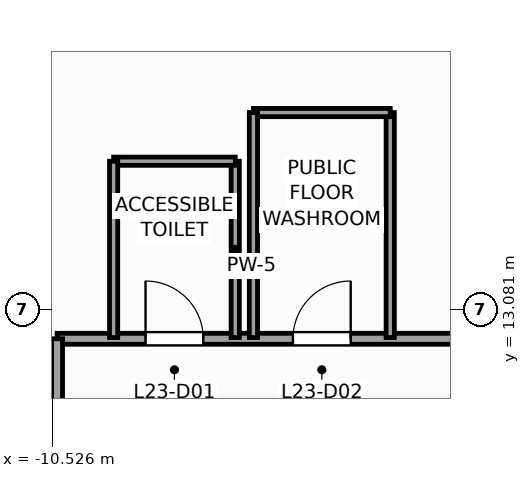
"""IFC4 building model, lengths in metres.
Left out: names, types, materials, properties, quantities, classifications, styles, units other than length and angle.
Written with IfcOpenShell. Run it as: python <this file> out.ifc"""

import sys

from ifc_helpers import new_model, si_unit, direction, frame, frame_2d, origin, place, context, subcontext, project, spatial, rectangle, extrude, source, transform, mapped, element, fill, save


model = new_model("IFC4")
c1 = context("Model", 3, precision=1e-05, world=origin(), true_north=direction((0.0, 1.0)))
c2 = subcontext(c1, "Body", "Model", "MODEL_VIEW")
j1 = project(units=[si_unit("LENGTHUNIT", "METRE"), si_unit("PLANEANGLEUNIT", "RADIAN")], contexts=[c1])
p1 = place(None, origin())
s1 = spatial("IfcSite", under=j1, at=p1, CompositionType="ELEMENT")
p2 = place(p1, origin())
s2 = spatial("IfcBuilding", under=s1, at=p2, CompositionType="ELEMENT")
p3 = place(p2, frame((0.0, 0.0, 99.2)))
s3 = spatial("IfcBuildingStorey", under=s2, at=p3, CompositionType="ELEMENT", Elevation=99.2)
p4 = place(p3, frame((-10.45, 12.6, 0.0), z_axis=(0.0, 0.0, 1.0), x_axis=(1.0, 0.0, 0.0)))
e1 = element("IfcWall", 1, at=p4, inside=s3, PredefinedType="PARTITIONING", context=c2, shape_type="SweptSolid", body=[
    extrude(rectangle(XDim=23.05, YDim=0.18, at=frame_2d((11.525, 0.0))), origin(), (0.0, 0.0, 1.0), 3.74),
])
p5 = place(p4, frame((1.455, 0.0, 0.0)))
e2 = element("IfcOpeningElement", 2, at=p5, cuts=e1, PredefinedType="OPENING", context=c2, shape_type="SweptSolid", body=[
    extrude(rectangle(XDim=0.95, YDim=2.1, at=frame_2d((0.475, 1.05))), frame((0.0, 0.1, 0.0), z_axis=(0.0, -1.0, 0.0), x_axis=(1.0, 0.0, 0.0)), (0.0, 0.0, 1.0), 0.2),
])
p6 = place(p4, frame((3.879, 0.0, 0.0)))
e3 = element("IfcOpeningElement", 3, at=p6, cuts=e1, PredefinedType="OPENING", context=c2, shape_type="SweptSolid", body=[
    extrude(rectangle(XDim=0.95, YDim=2.1, at=frame_2d((0.475, 1.05))), frame((0.0, 0.1, 0.0), z_axis=(0.0, -1.0, 0.0), x_axis=(1.0, 0.0, 0.0)), (0.0, 0.0, 1.0), 0.2),
])
p7 = place(p4, frame((14.436, 0.0, 0.0)))
e4 = element("IfcOpeningElement", 4, at=p7, cuts=e1, PredefinedType="OPENING", context=c2, shape_type="SweptSolid", body=[
    extrude(rectangle(XDim=1.1, YDim=2.2, at=frame_2d((0.55, 1.1))), frame((0.0, 0.1, 0.0), z_axis=(0.0, -1.0, 0.0), x_axis=(1.0, 0.0, 0.0)), (0.0, 0.0, 1.0), 0.2),
])
p8 = place(p3, frame((-10.45, -1.05, 0.0), z_axis=(0.0, 0.0, 1.0), x_axis=(0.0, 1.0, 0.0)))
e5 = element("IfcWall", 5, at=p8, inside=s3, PredefinedType="PARTITIONING", context=c2, shape_type="SweptSolid", body=[
    extrude(rectangle(XDim=13.65, YDim=0.18, at=frame_2d((6.825, 0.0))), origin(), (0.0, 0.0, 1.0), 3.74),
])
p9 = place(p3, frame((-7.52, 12.62, 0.0), z_axis=(0.0, 0.0, 1.0), x_axis=(0.0, 1.0, 0.0)))
e6 = element("IfcWall", 6, at=p9, inside=s3, PredefinedType="PARTITIONING", context=c2, shape_type="SweptSolid", body=[
    extrude(rectangle(XDim=2.9, YDim=0.135, at=frame_2d((1.45, 0.0))), origin(), (0.0, 0.0, 1.0), 3.74),
])
p10 = place(p3, frame((-9.52, 15.52, 0.0), z_axis=(0.0, 0.0, 1.0), x_axis=(1.0, 0.0, 0.0)))
e7 = element("IfcWall", 7, at=p10, inside=s3, PredefinedType="PARTITIONING", context=c2, shape_type="SweptSolid", body=[
    extrude(rectangle(XDim=2.0, YDim=0.135, at=frame_2d((1.0, 0.0))), origin(), (0.0, 0.0, 1.0), 3.74),
])
p11 = place(p3, frame((-9.52, 12.62, 0.0), z_axis=(0.0, 0.0, 1.0), x_axis=(0.0, 1.0, 0.0)))
e8 = element("IfcWall", 8, at=p11, inside=s3, PredefinedType="PARTITIONING", context=c2, shape_type="SweptSolid", body=[
    extrude(rectangle(XDim=2.9, YDim=0.135, at=frame_2d((1.45, 0.0))), origin(), (0.0, 0.0, 1.0), 3.74),
])
p12 = place(p3, frame((-4.971, 12.62, 0.0), z_axis=(0.0, 0.0, 1.0), x_axis=(0.0, 1.0, 0.0)))
e9 = element("IfcWall", 9, at=p12, inside=s3, PredefinedType="PARTITIONING", context=c2, shape_type="SweptSolid", body=[
    extrude(rectangle(XDim=3.7, YDim=0.135, at=frame_2d((1.85, 0.0))), origin(), (0.0, 0.0, 1.0), 3.74),
])
p13 = place(p3, frame((-7.221, 16.32, 0.0), z_axis=(0.0, 0.0, 1.0), x_axis=(1.0, 0.0, 0.0)))
e10 = element("IfcWall", 10, at=p13, inside=s3, PredefinedType="PARTITIONING", context=c2, shape_type="SweptSolid", body=[
    extrude(rectangle(XDim=2.25, YDim=0.135, at=frame_2d((1.125, 0.0))), origin(), (0.0, 0.0, 1.0), 3.74),
])
p14 = place(p3, frame((-7.221, 12.62, 0.0), z_axis=(0.0, 0.0, 1.0), x_axis=(0.0, 1.0, 0.0)))
e11 = element("IfcWall", 11, at=p14, inside=s3, PredefinedType="PARTITIONING", context=c2, shape_type="SweptSolid", body=[
    extrude(rectangle(XDim=3.7, YDim=0.135, at=frame_2d((1.85, 0.0))), origin(), (0.0, 0.0, 1.0), 3.74),
])
m1 = source(origin(), c2, "Body", "SweptSolid", [
    extrude(rectangle(XDim=0.95, YDim=2.1, at=frame_2d((0.475, 1.05))), frame((0.0, 0.025, 0.0), z_axis=(0.0, -1.0, 0.0), x_axis=(1.0, 0.0, 0.0)), (0.0, 0.0, 1.0), 0.05),
])
p15 = place(p5, origin())
e12 = element("IfcDoor", 12, at=p15, inside=s3, OperationType="SINGLE_SWING_LEFT", PredefinedType="DOOR", context=c2, shape_type="MappedRepresentation", body=[
    mapped(m1, transform((0.0, 0.0, 0.0), scale=1.0)),
])
fill(e2, e12)
p16 = place(p6, origin())
e13 = element("IfcDoor", 13, at=p16, inside=s3, OperationType="SINGLE_SWING_RIGHT", PredefinedType="DOOR", context=c2, shape_type="MappedRepresentation", body=[
    mapped(m1, transform((0.0, 0.0, 0.0), scale=1.0)),
])
fill(e3, e13)
save(model, sys.argv[1])
